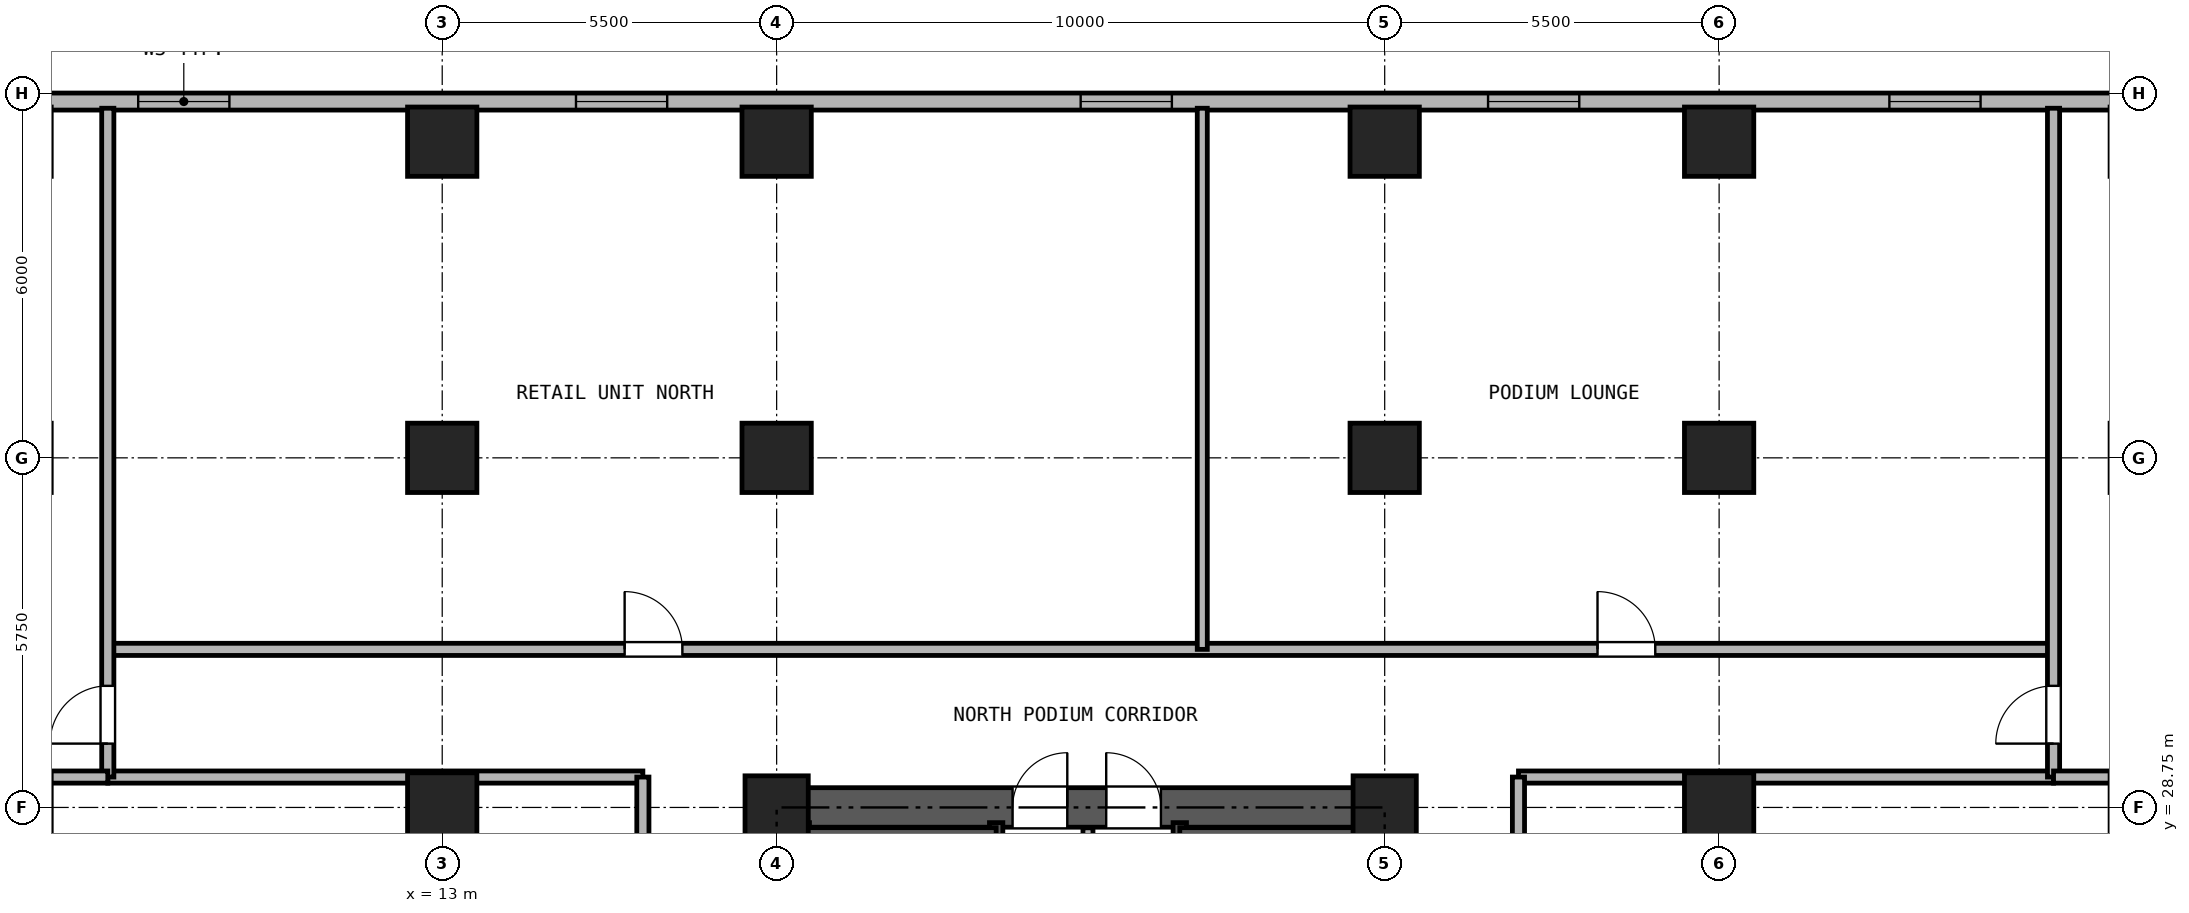
"""IFC4 building model, lengths in metres.
Left out: names, types, materials, properties, quantities, classifications, styles, units other than length and angle.
Written with IfcOpenShell. Run it as: python <this file> out.ifc"""

import sys

from ifc_helpers import new_model, si_unit, direction, frame, frame_2d, origin, origin_2d, place, context, subcontext, project, spatial, rectangle, hollow_rectangle, extrude, source, transform, mapped, element, fill, save


model = new_model("IFC4")
c1 = context("Model", 3, precision=1e-05, world=origin(), true_north=direction((0.0, 1.0)))
c2 = subcontext(c1, "Body", "Model", "MODEL_VIEW")
j1 = project(units=[si_unit("LENGTHUNIT", "METRE"), si_unit("PLANEANGLEUNIT", "RADIAN")], contexts=[c1])
p1 = place(None, origin())
s1 = spatial("IfcSite", under=j1, at=p1, CompositionType="ELEMENT")
p2 = place(p1, origin())
s2 = spatial("IfcBuilding", under=s1, at=p2, CompositionType="ELEMENT")
p3 = place(p2, frame((0.0, 0.0, 9.0)))
s3 = spatial("IfcBuildingStorey", under=s2, at=p3, CompositionType="ELEMENT", Elevation=9.0)
m1 = source(origin(), c2, "Body", "SweptSolid", [
    extrude(hollow_rectangle(XDim=1.14, YDim=1.14, WallThickness=0.07, at=origin_2d()), origin(), (0.0, 0.0, 1.0), 4.18),
])
for number, where, z_axis, x_axis in (
    (1, (13.0, 39.7, 0.0), (0.0, 0.0, 1.0), (1.0, 0.0, 0.0)),
    (2, (18.5, 39.7, 0.0), (0.0, 0.0, 1.0), (1.0, 0.0, 0.0)),
    (3, (28.5, 39.7, 0.0), (0.0, 0.0, 1.0), (1.0, 0.0, 0.0)),
    (4, (34.0, 39.7, 0.0), (0.0, 0.0, 1.0), (1.0, 0.0, 0.0)),
    (5, (13.0, 28.75, 0.0), (0.0, 0.0, 1.0), (1.0, 0.0, 0.0)),
    (6, (13.0, 34.5, 0.0), (0.0, 0.0, 1.0), (1.0, 0.0, 0.0)),
):
    element("IfcColumn", number, at=place(p3, frame(where, z_axis=z_axis, x_axis=x_axis)), inside=s3, PredefinedType="COLUMN", context=c2, shape_type="MappedRepresentation", body=[
        mapped(m1, transform((0.0, 0.0, 0.0), x_axis=(1.0, 0.0, 0.0), y_axis=(0.0, 1.0, 0.0), z_axis=(0.0, 0.0, 1.0), scale=1.0)),
    ])
m2 = source(origin(), c2, "Body", "SweptSolid", [
    extrude(hollow_rectangle(XDim=1.04, YDim=1.04, WallThickness=0.065, at=origin_2d()), origin(), (0.0, 0.0, 1.0), 4.18),
])
p4 = place(p3, frame((18.5, 28.75, 0.0), z_axis=(0.0, 0.0, 1.0), x_axis=(1.0, 0.0, 0.0)))
e7 = element("IfcColumn", 7, at=p4, inside=s3, PredefinedType="COLUMN", context=c2, shape_type="MappedRepresentation", body=[
    mapped(m2, transform((0.0, 0.0, 0.0), x_axis=(1.0, 0.0, 0.0), y_axis=(0.0, 1.0, 0.0), z_axis=(0.0, 0.0, 1.0), scale=1.0)),
])
p5 = place(p3, frame((18.5, 34.5, 0.0), z_axis=(0.0, 0.0, 1.0), x_axis=(1.0, 0.0, 0.0)))
e8 = element("IfcColumn", 8, at=p5, inside=s3, PredefinedType="COLUMN", context=c2, shape_type="MappedRepresentation", body=[
    mapped(m1, transform((0.0, 0.0, 0.0), x_axis=(1.0, 0.0, 0.0), y_axis=(0.0, 1.0, 0.0), z_axis=(0.0, 0.0, 1.0), scale=1.0)),
])
p6 = place(p3, frame((28.5, 28.75, 0.0), z_axis=(0.0, 0.0, 1.0), x_axis=(1.0, 0.0, 0.0)))
e9 = element("IfcColumn", 9, at=p6, inside=s3, PredefinedType="COLUMN", context=c2, shape_type="MappedRepresentation", body=[
    mapped(m2, transform((0.0, 0.0, 0.0), x_axis=(1.0, 0.0, 0.0), y_axis=(0.0, 1.0, 0.0), z_axis=(0.0, 0.0, 1.0), scale=1.0)),
])
for number, where, z_axis, x_axis in (
    (10, (28.5, 34.5, 0.0), (0.0, 0.0, 1.0), (1.0, 0.0, 0.0)),
    (11, (34.0, 28.75, 0.0), (0.0, 0.0, 1.0), (1.0, 0.0, 0.0)),
    (12, (34.0, 34.5, 0.0), (0.0, 0.0, 1.0), (1.0, 0.0, 0.0)),
):
    element("IfcColumn", number, at=place(p3, frame(where, z_axis=z_axis, x_axis=x_axis)), inside=s3, PredefinedType="COLUMN", context=c2, shape_type="MappedRepresentation", body=[
        mapped(m1, transform((0.0, 0.0, 0.0), x_axis=(1.0, 0.0, 0.0), y_axis=(0.0, 1.0, 0.0), z_axis=(0.0, 0.0, 1.0), scale=1.0)),
    ])
p7 = place(p3, frame((4.0, 40.36, 0.0), z_axis=(0.0, 0.0, 1.0), x_axis=(1.0, 0.0, 0.0)))
e13 = element("IfcWall", 13, at=p7, inside=s3, PredefinedType="SOLIDWALL", context=c2, shape_type="SweptSolid", body=[
    extrude(rectangle(XDim=39.0, YDim=0.28, at=frame_2d((19.5, 0.0))), origin(), (0.0, 0.0, 1.0), 4.18),
])
p8 = place(p7, frame((4.0, 0.0, 0.9)))
e14 = element("IfcOpeningElement", 14, at=p8, cuts=e13, PredefinedType="OPENING", context=c2, shape_type="SweptSolid", body=[
    extrude(rectangle(XDim=1.5, YDim=1.8, at=frame_2d((0.75, 0.9))), frame((0.0, 0.15, 0.0), z_axis=(0.0, -1.0, 0.0), x_axis=(1.0, 0.0, 0.0)), (0.0, 0.0, 1.0), 0.3),
])
p9 = place(p7, frame((11.2, 0.0, 0.9)))
e15 = element("IfcOpeningElement", 15, at=p9, cuts=e13, PredefinedType="OPENING", context=c2, shape_type="SweptSolid", body=[
    extrude(rectangle(XDim=1.5, YDim=1.8, at=frame_2d((0.75, 0.9))), frame((0.0, 0.15, 0.0), z_axis=(0.0, -1.0, 0.0), x_axis=(1.0, 0.0, 0.0)), (0.0, 0.0, 1.0), 0.3),
])
p10 = place(p7, frame((19.5, 0.0, 0.9)))
e16 = element("IfcOpeningElement", 16, at=p10, cuts=e13, PredefinedType="OPENING", context=c2, shape_type="SweptSolid", body=[
    extrude(rectangle(XDim=1.5, YDim=1.8, at=frame_2d((0.75, 0.9))), frame((0.0, 0.15, 0.0), z_axis=(0.0, -1.0, 0.0), x_axis=(1.0, 0.0, 0.0)), (0.0, 0.0, 1.0), 0.3),
])
p11 = place(p7, frame((26.2, 0.0, 0.9)))
e17 = element("IfcOpeningElement", 17, at=p11, cuts=e13, PredefinedType="OPENING", context=c2, shape_type="SweptSolid", body=[
    extrude(rectangle(XDim=1.5, YDim=1.8, at=frame_2d((0.75, 0.9))), frame((0.0, 0.15, 0.0), z_axis=(0.0, -1.0, 0.0), x_axis=(1.0, 0.0, 0.0)), (0.0, 0.0, 1.0), 0.3),
])
p12 = place(p7, frame((32.8, 0.0, 0.9)))
e18 = element("IfcOpeningElement", 18, at=p12, cuts=e13, PredefinedType="OPENING", context=c2, shape_type="SweptSolid", body=[
    extrude(rectangle(XDim=1.5, YDim=1.8, at=frame_2d((0.75, 0.9))), frame((0.0, 0.15, 0.0), z_axis=(0.0, -1.0, 0.0), x_axis=(1.0, 0.0, 0.0)), (0.0, 0.0, 1.0), 0.3),
])
p13 = place(p3, frame((18.175, 28.75, 0.0), z_axis=(0.0, 0.0, 1.0), x_axis=(1.0, 0.0, 0.0)))
e19 = element("IfcWall", 19, at=p13, inside=s3, PredefinedType="SHEAR", context=c2, shape_type="SweptSolid", body=[
    extrude(rectangle(XDim=10.65, YDim=0.65, at=frame_2d((5.325, 0.0))), origin(), (0.0, 0.0, 1.0), 4.18),
])
p14 = place(p13, frame((4.205, 0.0, 0.0)))
e20 = element("IfcOpeningElement", 20, at=p14, cuts=e19, PredefinedType="OPENING", context=c2, shape_type="SweptSolid", body=[
    extrude(rectangle(XDim=0.9, YDim=2.05, at=frame_2d((0.45, 1.025))), frame((0.0, 0.335, 0.0), z_axis=(0.0, -1.0, 0.0), x_axis=(1.0, 0.0, 0.0)), (0.0, 0.0, 1.0), 0.67),
])
p15 = place(p13, frame((5.745, 0.0, 0.0)))
e21 = element("IfcOpeningElement", 21, at=p15, cuts=e19, PredefinedType="OPENING", context=c2, shape_type="SweptSolid", body=[
    extrude(rectangle(XDim=0.9, YDim=2.05, at=frame_2d((0.45, 1.025))), frame((0.0, 0.335, 0.0), z_axis=(0.0, -1.0, 0.0), x_axis=(1.0, 0.0, 0.0)), (0.0, 0.0, 1.0), 0.67),
])
p16 = place(p3, frame((18.5, 11.825, 0.0), z_axis=(0.0, 0.0, 1.0), x_axis=(0.0, 1.0, 0.0)))
e22 = element("IfcWall", 22, at=p16, inside=s3, PredefinedType="SHEAR", context=c2, shape_type="SweptSolid", body=[
    extrude(rectangle(XDim=16.6, YDim=0.65, at=frame_2d((8.3, 0.0))), origin(), (0.0, 0.0, 1.0), 4.18),
])
p17 = place(p16, frame((7.325, 0.0, 0.0)))
e23 = element("IfcOpeningElement", 23, at=p17, cuts=e22, PredefinedType="OPENING", context=c2, shape_type="SweptSolid", body=[
    extrude(rectangle(XDim=1.15, YDim=2.2, at=frame_2d((0.575, 1.1))), frame((0.0, 0.335, 0.0), z_axis=(0.0, -1.0, 0.0), x_axis=(1.0, 0.0, 0.0)), (0.0, 0.0, 1.0), 0.67),
])
p18 = place(p3, frame((28.5, 11.825, 0.0), z_axis=(0.0, 0.0, 1.0), x_axis=(0.0, 1.0, 0.0)))
e24 = element("IfcWall", 24, at=p18, inside=s3, PredefinedType="SHEAR", context=c2, shape_type="SweptSolid", body=[
    extrude(rectangle(XDim=16.6, YDim=0.65, at=frame_2d((8.3, 0.0))), origin(), (0.0, 0.0, 1.0), 4.18),
])
p19 = place(p18, frame((7.325, 0.0, 0.0)))
e25 = element("IfcOpeningElement", 25, at=p19, cuts=e24, PredefinedType="OPENING", context=c2, shape_type="SweptSolid", body=[
    extrude(rectangle(XDim=1.15, YDim=2.2, at=frame_2d((0.575, 1.1))), frame((0.0, 0.335, 0.0), z_axis=(0.0, -1.0, 0.0), x_axis=(1.0, 0.0, 0.0)), (0.0, 0.0, 1.0), 0.67),
])
for number, where, z_axis, x_axis in (
    (26, (18.93, 21.39, 0.0), (0.0, 0.0, 1.0), (0.0, 1.0, 0.0)),
    (27, (22.11, 21.39, 0.0), (0.0, 0.0, 1.0), (0.0, 1.0, 0.0)),
    (28, (25.13, 21.39, 0.0), (0.0, 0.0, 1.0), (0.0, 1.0, 0.0)),
):
    element("IfcWall", number, at=place(p3, frame(where, z_axis=z_axis, x_axis=x_axis)), inside=s3, PredefinedType="SOLIDWALL", context=c2, shape_type="SweptSolid", body=[
        extrude(rectangle(XDim=7.11, YDim=0.22, at=frame_2d((3.555, 0.0))), origin(), (0.0, 0.0, 1.0), 4.18),
    ])
p20 = place(p3, frame((18.835, 28.335, 0.0), z_axis=(0.0, 0.0, 1.0), x_axis=(1.0, 0.0, 0.0)))
e29 = element("IfcWall", 29, at=p20, inside=s3, PredefinedType="PARTITIONING", context=c2, shape_type="SweptSolid", body=[
    extrude(rectangle(XDim=3.275, YDim=0.165, at=frame_2d((1.638, 0.0))), origin(), (0.0, 0.0, 1.0), 4.18),
])
p21 = place(p3, frame((25.13, 28.335, 0.0), z_axis=(0.0, 0.0, 1.0), x_axis=(1.0, 0.0, 0.0)))
e30 = element("IfcWall", 30, at=p21, inside=s3, PredefinedType="PARTITIONING", context=c2, shape_type="SweptSolid", body=[
    extrude(rectangle(XDim=3.035, YDim=0.165, at=frame_2d((1.518, 0.0))), origin(), (0.0, 0.0, 1.0), 4.18),
])
p22 = place(p3, frame((23.62, 24.4, 0.0), z_axis=(0.0, 0.0, 1.0), x_axis=(0.0, 1.0, 0.0)))
e31 = element("IfcWall", 31, at=p22, inside=s3, PredefinedType="PARTITIONING", context=c2, shape_type="SweptSolid", body=[
    extrude(rectangle(XDim=4.015, YDim=0.165, at=frame_2d((2.008, 0.0))), origin(), (0.0, 0.0, 1.0), 4.18),
])
p23 = place(p3, frame((7.5, 31.35, 0.0), z_axis=(0.0, 0.0, 1.0), x_axis=(1.0, 0.0, 0.0)))
e32 = element("IfcWall", 32, at=p23, inside=s3, PredefinedType="PARTITIONING", context=c2, shape_type="SweptSolid", body=[
    extrude(rectangle(XDim=32.0, YDim=0.2, at=frame_2d((16.0, 0.0))), origin(), (0.0, 0.0, 1.0), 4.18),
])
p24 = place(p23, frame((8.5, 0.0, 0.0)))
e33 = element("IfcOpeningElement", 33, at=p24, cuts=e32, PredefinedType="OPENING", context=c2, shape_type="SweptSolid", body=[
    extrude(rectangle(XDim=0.95, YDim=2.15, at=frame_2d((0.475, 1.075))), frame((0.0, 0.11, 0.0), z_axis=(0.0, -1.0, 0.0), x_axis=(1.0, 0.0, 0.0)), (0.0, 0.0, 1.0), 0.22),
])
p25 = place(p23, frame((24.5, 0.0, 0.0)))
e34 = element("IfcOpeningElement", 34, at=p25, cuts=e32, PredefinedType="OPENING", context=c2, shape_type="SweptSolid", body=[
    extrude(rectangle(XDim=0.95, YDim=2.15, at=frame_2d((0.475, 1.075))), frame((0.0, 0.11, 0.0), z_axis=(0.0, -1.0, 0.0), x_axis=(1.0, 0.0, 0.0)), (0.0, 0.0, 1.0), 0.22),
])
for number, where, z_axis, x_axis in (
    (35, (7.5, 29.25, 0.0), (0.0, 0.0, 1.0), (1.0, 0.0, 0.0)),
    (36, (30.7, 29.25, 0.0), (0.0, 0.0, 1.0), (1.0, 0.0, 0.0)),
):
    element("IfcWall", number, at=place(p3, frame(where, z_axis=z_axis, x_axis=x_axis)), inside=s3, PredefinedType="PARTITIONING", context=c2, shape_type="SweptSolid", body=[
        extrude(rectangle(XDim=8.8, YDim=0.2, at=frame_2d((4.4, 0.0))), origin(), (0.0, 0.0, 1.0), 4.18),
    ])
p26 = place(p3, frame((16.3, 11.0, 0.0), z_axis=(0.0, 0.0, 1.0), x_axis=(0.0, 1.0, 0.0)))
e37 = element("IfcWall", 37, at=p26, inside=s3, PredefinedType="PARTITIONING", context=c2, shape_type="SweptSolid", body=[
    extrude(rectangle(XDim=18.25, YDim=0.2, at=frame_2d((9.125, 0.0))), origin(), (0.0, 0.0, 1.0), 4.18),
])
p27 = place(p26, frame((4.25, 0.0, 0.0)))
e38 = element("IfcOpeningElement", 38, at=p27, cuts=e37, PredefinedType="OPENING", context=c2, shape_type="SweptSolid", body=[
    extrude(rectangle(XDim=0.95, YDim=2.15, at=frame_2d((0.475, 1.075))), frame((0.0, 0.11, 0.0), z_axis=(0.0, -1.0, 0.0), x_axis=(1.0, 0.0, 0.0)), (0.0, 0.0, 1.0), 0.22),
])
p28 = place(p26, frame((13.375, 0.0, 0.0)))
e39 = element("IfcOpeningElement", 39, at=p28, cuts=e37, PredefinedType="OPENING", context=c2, shape_type="SweptSolid", body=[
    extrude(rectangle(XDim=0.95, YDim=2.15, at=frame_2d((0.475, 1.075))), frame((0.0, 0.11, 0.0), z_axis=(0.0, -1.0, 0.0), x_axis=(1.0, 0.0, 0.0)), (0.0, 0.0, 1.0), 0.22),
])
p29 = place(p3, frame((30.7, 11.0, 0.0), z_axis=(0.0, 0.0, 1.0), x_axis=(0.0, 1.0, 0.0)))
e40 = element("IfcWall", 40, at=p29, inside=s3, PredefinedType="PARTITIONING", context=c2, shape_type="SweptSolid", body=[
    extrude(rectangle(XDim=18.25, YDim=0.2, at=frame_2d((9.125, 0.0))), origin(), (0.0, 0.0, 1.0), 4.18),
])
p30 = place(p29, frame((8.625, 0.0, 0.0)))
e41 = element("IfcOpeningElement", 41, at=p30, cuts=e40, PredefinedType="OPENING", context=c2, shape_type="SweptSolid", body=[
    extrude(rectangle(XDim=0.95, YDim=2.15, at=frame_2d((0.475, 1.075))), frame((0.0, 0.11, 0.0), z_axis=(0.0, -1.0, 0.0), x_axis=(1.0, 0.0, 0.0)), (0.0, 0.0, 1.0), 0.22),
])
p31 = place(p3, frame((7.5, 29.25, 0.0), z_axis=(0.0, 0.0, 1.0), x_axis=(0.0, 1.0, 0.0)))
e42 = element("IfcWall", 42, at=p31, inside=s3, PredefinedType="PARTITIONING", context=c2, shape_type="SweptSolid", body=[
    extrude(rectangle(XDim=11.0, YDim=0.2, at=frame_2d((5.5, 0.0))), origin(), (0.0, 0.0, 1.0), 4.18),
])
p32 = place(p31, frame((0.55, 0.0, 0.0)))
e43 = element("IfcOpeningElement", 43, at=p32, cuts=e42, PredefinedType="OPENING", context=c2, shape_type="SweptSolid", body=[
    extrude(rectangle(XDim=0.95, YDim=2.15, at=frame_2d((0.475, 1.075))), frame((0.0, 0.11, 0.0), z_axis=(0.0, -1.0, 0.0), x_axis=(1.0, 0.0, 0.0)), (0.0, 0.0, 1.0), 0.22),
])
p33 = place(p3, frame((39.5, 29.25, 0.0), z_axis=(0.0, 0.0, 1.0), x_axis=(0.0, 1.0, 0.0)))
e44 = element("IfcWall", 44, at=p33, inside=s3, PredefinedType="PARTITIONING", context=c2, shape_type="SweptSolid", body=[
    extrude(rectangle(XDim=11.0, YDim=0.2, at=frame_2d((5.5, 0.0))), origin(), (0.0, 0.0, 1.0), 4.18),
])
p34 = place(p33, frame((0.55, 0.0, 0.0)))
e45 = element("IfcOpeningElement", 45, at=p34, cuts=e44, PredefinedType="OPENING", context=c2, shape_type="SweptSolid", body=[
    extrude(rectangle(XDim=0.95, YDim=2.15, at=frame_2d((0.475, 1.075))), frame((0.0, 0.11, 0.0), z_axis=(0.0, -1.0, 0.0), x_axis=(1.0, 0.0, 0.0)), (0.0, 0.0, 1.0), 0.22),
])
for number, where, z_axis, x_axis in (
    (46, (0.25, 29.25, 0.0), (0.0, 0.0, 1.0), (1.0, 0.0, 0.0)),
    (47, (39.5, 29.25, 0.0), (0.0, 0.0, 1.0), (1.0, 0.0, 0.0)),
):
    element("IfcWall", number, at=place(p3, frame(where, z_axis=z_axis, x_axis=x_axis)), inside=s3, PredefinedType="PARTITIONING", context=c2, shape_type="SweptSolid", body=[
        extrude(rectangle(XDim=7.25, YDim=0.2, at=frame_2d((3.625, 0.0))), origin(), (0.0, 0.0, 1.0), 4.18),
    ])
p35 = place(p3, frame((25.5, 31.35, 0.0), z_axis=(0.0, 0.0, 1.0), x_axis=(0.0, 1.0, 0.0)))
e48 = element("IfcWall", 48, at=p35, inside=s3, PredefinedType="PARTITIONING", context=c2, shape_type="SweptSolid", body=[
    extrude(rectangle(XDim=8.9, YDim=0.165, at=frame_2d((4.45, 0.0))), origin(), (0.0, 0.0, 1.0), 4.18),
])
p36 = place(p8, origin())
e49 = element("IfcWindow", 49, at=p36, inside=s3, PartitioningType="SINGLE_PANEL", PredefinedType="WINDOW", context=c2, shape_type="SweptSolid", body=[
    extrude(rectangle(XDim=1.5, YDim=1.8, at=frame_2d((0.75, 0.9))), frame((0.0, 0.03, 0.0), z_axis=(0.0, -1.0, 0.0), x_axis=(1.0, 0.0, 0.0)), (0.0, 0.0, 1.0), 0.06),
])
fill(e14, e49)
p37 = place(p9, origin())
e50 = element("IfcWindow", 50, at=p37, inside=s3, PartitioningType="SINGLE_PANEL", PredefinedType="WINDOW", context=c2, shape_type="SweptSolid", body=[
    extrude(rectangle(XDim=1.5, YDim=1.8, at=frame_2d((0.75, 0.9))), frame((0.0, 0.03, 0.0), z_axis=(0.0, -1.0, 0.0), x_axis=(1.0, 0.0, 0.0)), (0.0, 0.0, 1.0), 0.06),
])
fill(e15, e50)
p38 = place(p10, origin())
e51 = element("IfcWindow", 51, at=p38, inside=s3, PartitioningType="SINGLE_PANEL", PredefinedType="WINDOW", context=c2, shape_type="SweptSolid", body=[
    extrude(rectangle(XDim=1.5, YDim=1.8, at=frame_2d((0.75, 0.9))), frame((0.0, 0.03, 0.0), z_axis=(0.0, -1.0, 0.0), x_axis=(1.0, 0.0, 0.0)), (0.0, 0.0, 1.0), 0.06),
])
fill(e16, e51)
p39 = place(p11, origin())
e52 = element("IfcWindow", 52, at=p39, inside=s3, PartitioningType="SINGLE_PANEL", PredefinedType="WINDOW", context=c2, shape_type="SweptSolid", body=[
    extrude(rectangle(XDim=1.5, YDim=1.8, at=frame_2d((0.75, 0.9))), frame((0.0, 0.03, 0.0), z_axis=(0.0, -1.0, 0.0), x_axis=(1.0, 0.0, 0.0)), (0.0, 0.0, 1.0), 0.06),
])
fill(e17, e52)
p40 = place(p12, origin())
e53 = element("IfcWindow", 53, at=p40, inside=s3, PartitioningType="SINGLE_PANEL", PredefinedType="WINDOW", context=c2, shape_type="SweptSolid", body=[
    extrude(rectangle(XDim=1.5, YDim=1.8, at=frame_2d((0.75, 0.9))), frame((0.0, 0.03, 0.0), z_axis=(0.0, -1.0, 0.0), x_axis=(1.0, 0.0, 0.0)), (0.0, 0.0, 1.0), 0.06),
])
fill(e18, e53)
p41 = place(p14, origin())
e54 = element("IfcDoor", 54, at=p41, inside=s3, OperationType="SINGLE_SWING_RIGHT", PredefinedType="DOOR", context=c2, shape_type="SweptSolid", body=[
    extrude(rectangle(XDim=0.9, YDim=2.05, at=frame_2d((0.45, 1.025))), frame((0.0, 0.025, 0.0), z_axis=(0.0, -1.0, 0.0), x_axis=(1.0, 0.0, 0.0)), (0.0, 0.0, 1.0), 0.05),
])
fill(e20, e54)
p42 = place(p15, origin())
e55 = element("IfcDoor", 55, at=p42, inside=s3, OperationType="SINGLE_SWING_LEFT", PredefinedType="DOOR", context=c2, shape_type="SweptSolid", body=[
    extrude(rectangle(XDim=0.9, YDim=2.05, at=frame_2d((0.45, 1.025))), frame((0.0, 0.025, 0.0), z_axis=(0.0, -1.0, 0.0), x_axis=(1.0, 0.0, 0.0)), (0.0, 0.0, 1.0), 0.05),
])
fill(e21, e55)
p43 = place(p24, origin())
e56 = element("IfcDoor", 56, at=p43, inside=s3, OperationType="SINGLE_SWING_LEFT", PredefinedType="DOOR", context=c2, shape_type="SweptSolid", body=[
    extrude(rectangle(XDim=0.95, YDim=2.15, at=frame_2d((0.475, 1.075))), frame((0.0, 0.025, 0.0), z_axis=(0.0, -1.0, 0.0), x_axis=(1.0, 0.0, 0.0)), (0.0, 0.0, 1.0), 0.05),
])
fill(e33, e56)
p44 = place(p25, origin())
e57 = element("IfcDoor", 57, at=p44, inside=s3, OperationType="SINGLE_SWING_LEFT", PredefinedType="DOOR", context=c2, shape_type="SweptSolid", body=[
    extrude(rectangle(XDim=0.95, YDim=2.15, at=frame_2d((0.475, 1.075))), frame((0.0, 0.025, 0.0), z_axis=(0.0, -1.0, 0.0), x_axis=(1.0, 0.0, 0.0)), (0.0, 0.0, 1.0), 0.05),
])
fill(e34, e57)
p45 = place(p32, frame((0.95, 0.0, 0.0), z_axis=(0.0, 0.0, 1.0), x_axis=(-1.0, 0.0, 0.0)))
e58 = element("IfcDoor", 58, at=p45, inside=s3, OperationType="SINGLE_SWING_LEFT", PredefinedType="DOOR", context=c2, shape_type="SweptSolid", body=[
    extrude(rectangle(XDim=0.95, YDim=2.15, at=frame_2d((0.475, 1.075))), frame((0.0, 0.025, 0.0), z_axis=(0.0, -1.0, 0.0), x_axis=(1.0, 0.0, 0.0)), (0.0, 0.0, 1.0), 0.05),
])
fill(e43, e58)
p46 = place(p34, origin())
e59 = element("IfcDoor", 59, at=p46, inside=s3, OperationType="SINGLE_SWING_LEFT", PredefinedType="DOOR", context=c2, shape_type="SweptSolid", body=[
    extrude(rectangle(XDim=0.95, YDim=2.15, at=frame_2d((0.475, 1.075))), frame((0.0, 0.025, 0.0), z_axis=(0.0, -1.0, 0.0), x_axis=(1.0, 0.0, 0.0)), (0.0, 0.0, 1.0), 0.05),
])
fill(e45, e59)
save(model, sys.argv[1])
